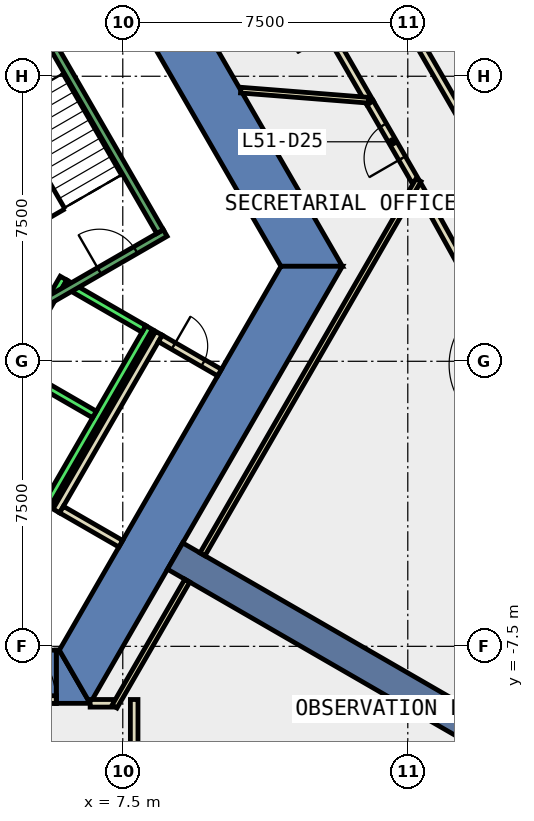
"""IFC4 building model, lengths in metres.
Left out: names, types, materials, properties, quantities, classifications, styles, units other than length and angle.
Written with IfcOpenShell. Run it as: python <this file> out.ifc"""

import sys

from ifc_helpers import new_model, si_unit, direction, frame, frame_2d, origin, place, context, subcontext, project, spatial, polyline, rectangle, outline, extrude, element, fill, save


model = new_model("IFC4")
c1 = context("Model", 3, precision=1e-05, world=origin(), true_north=direction((0.0, 1.0)))
c2 = subcontext(c1, "Body", "Model", "MODEL_VIEW")
j1 = project(units=[si_unit("LENGTHUNIT", "METRE"), si_unit("PLANEANGLEUNIT", "RADIAN")], contexts=[c1])
p1 = place(None, origin())
s1 = spatial("IfcSite", under=j1, at=p1, CompositionType="ELEMENT")
p2 = place(p1, origin())
s2 = spatial("IfcBuilding", under=s1, at=p2, CompositionType="ELEMENT")
p3 = place(p2, frame((0.0, 0.0, 227.6)))
s3 = spatial("IfcBuildingStorey", under=s2, at=p3, CompositionType="ELEMENT", Elevation=227.6)
p4 = place(p3, frame((0.0, 0.0, -0.4)))
e1 = element("IfcWall", 1, at=p4, inside=s3, PredefinedType="SHEAR", context=c2, shape_type="SweptSolid", body=[
    extrude(outline(polyline([(8.084, 11.498), (6.871, 10.798), (11.662, 2.5), (13.279, 2.5), (8.084, 11.498)])), origin(), (0.0, 0.0, 1.0), 4.2),
])
p5 = place(p3, frame((0.0, 0.0, -0.4)))
e2 = element("IfcWall", 2, at=p5, inside=s3, PredefinedType="SHEAR", context=c2, shape_type="SweptSolid", body=[
    extrude(outline(polyline([(5.75, -7.6), (5.75, -9.0), (6.64, -9.0), (5.831, -7.6), (5.75, -7.6)])), origin(), (0.0, 0.0, 1.0), 4.2),
])
p6 = place(p3, frame((0.0, 0.0, 3.6)))
e3 = element("IfcWall", 3, at=p6, inside=s3, PredefinedType="SHEAR", context=c2, shape_type="SweptSolid", body=[
    extrude(outline(polyline([(5.75, -9.0), (5.75, -7.6), (3.75, -7.6), (3.75, -9.0), (5.75, -9.0)])), origin(), (0.0, 0.0, 1.0), 0.2),
])
p7 = place(p3, frame((0.0, 0.0, -0.4)))
e4 = element("IfcWall", 4, at=p7, inside=s3, PredefinedType="SHEAR", context=c2, shape_type="SweptSolid", body=[
    extrude(outline(polyline([(6.64, -9.0), (13.279, 2.5), (11.662, 2.5), (5.831, -7.6), (6.64, -9.0)])), origin(), (0.0, 0.0, 1.0), 4.2),
])
p8 = place(p3, frame((8.877, -5.125, -0.4), z_axis=(0.0, 0.0, 1.0), x_axis=(0.866017533419, -0.500013631625, 0.0)))
e5 = element("IfcWall", 5, at=p8, inside=s3, PredefinedType="SHEAR", context=c2, shape_type="SweptSolid", body=[
    extrude(rectangle(XDim=9.0, YDim=0.8, at=frame_2d((4.5, 0.0))), origin(), (0.0, 0.0, 1.0), 4.2),
])
p9 = place(p3, frame((15.194, 4.747, 0.0), z_axis=(0.0, 0.0, 1.0), x_axis=(-0.500140598757, 0.865944213836, 0.0)))
e6 = element("IfcWall", 6, at=p9, inside=s3, PredefinedType="PARTITIONING", context=c2, shape_type="SweptSolid", body=[
    extrude(rectangle(XDim=2.375, YDim=0.2, at=frame_2d((1.188, 0.0))), origin(), (0.0, 0.0, 1.0), 3.8),
])
p10 = place(p9, frame((0.688, 0.0, 0.0)))
e7 = element("IfcOpeningElement", 7, at=p10, cuts=e6, PredefinedType="OPENING", context=c2, shape_type="SweptSolid", body=[
    extrude(rectangle(XDim=1.0, YDim=2.1, at=frame_2d((0.5, 1.05))), frame((0.0, 0.11, 0.0), z_axis=(0.0, -1.0, 0.0), x_axis=(1.0, 0.0, 0.0)), (0.0, 0.0, 1.0), 0.22),
])
p11 = place(p3, frame((14.006, 6.804, 0.0), z_axis=(0.0, 0.0, 1.0), x_axis=(-0.500032993936, 0.866006353889, 0.0)))
e8 = element("IfcWall", 8, at=p11, inside=s3, PredefinedType="PARTITIONING", context=c2, shape_type="SweptSolid", body=[
    extrude(rectangle(XDim=5.172, YDim=0.2, at=frame_2d((2.586, 0.0))), origin(), (0.0, 0.0, 1.0), 3.8),
])
p12 = place(p11, frame((2.086, 0.0, 0.0)))
e9 = element("IfcOpeningElement", 9, at=p12, cuts=e8, PredefinedType="OPENING", context=c2, shape_type="SweptSolid", body=[
    extrude(rectangle(XDim=1.0, YDim=2.1, at=frame_2d((0.5, 1.05))), frame((0.0, 0.11, 0.0), z_axis=(0.0, -1.0, 0.0), x_axis=(1.0, 0.0, 0.0)), (0.0, 0.0, 1.0), 0.22),
])
p13 = place(p3, frame((19.419, -2.856, 0.0), z_axis=(0.0, 0.0, 1.0), x_axis=(-0.484683114876, 0.874689818252, 0.0)))
e10 = element("IfcWall", 10, at=p13, inside=s3, PredefinedType="PARTITIONING", context=c2, shape_type="SweptSolid", body=[
    extrude(rectangle(XDim=8.123, YDim=0.2, at=frame_2d((4.062, 0.0))), origin(), (0.0, 0.0, 1.0), 3.8),
])
p14 = place(p13, frame((3.161, 0.0, 0.0)))
e11 = element("IfcOpeningElement", 11, at=p14, cuts=e10, PredefinedType="OPENING", context=c2, shape_type="SweptSolid", body=[
    extrude(rectangle(XDim=1.8, YDim=2.1, at=frame_2d((0.9, 1.05))), frame((0.0, 0.11, 0.0), z_axis=(0.0, -1.0, 0.0), x_axis=(1.0, 0.0, 0.0)), (0.0, 0.0, 1.0), 0.22),
])
p15 = place(p3, frame((15.482, 4.249, 0.0), z_axis=(0.0, 0.0, 1.0), x_axis=(-0.500832493767, 0.865544229481, 0.0)))
e12 = element("IfcWall", 12, at=p15, inside=s3, PredefinedType="PARTITIONING", context=c2, shape_type="SweptSolid", body=[
    extrude(rectangle(XDim=0.425, YDim=0.2, at=frame_2d((0.212, 0.0))), origin(), (0.0, 0.0, 1.0), 3.8),
])
p16 = place(p3, frame((15.135, 8.65, 0.0), z_axis=(0.0, 0.0, 1.0), x_axis=(0.500102734445, -0.865966081899, 0.0)))
e13 = element("IfcWall", 13, at=p16, inside=s3, PredefinedType="PARTITIONING", context=c2, shape_type="SweptSolid", body=[
    extrude(rectangle(XDim=4.001, YDim=0.2, at=frame_2d((2.0, 0.0))), origin(), (0.0, 0.0, 1.0), 3.8),
])
p17 = place(p3, frame((5.751, -3.938, 0.0), z_axis=(0.0, 0.0, 1.0), x_axis=(0.500034260056, 0.866005622828, 0.0)))
e14 = element("IfcWall", 14, at=p17, inside=s3, PredefinedType="PARTITIONING", context=c2, shape_type="SweptSolid", body=[
    extrude(rectangle(XDim=5.399, YDim=0.2, at=frame_2d((2.7, 0.0))), origin(), (0.0, 0.0, 1.0), 3.8),
])
p18 = place(p3, frame((8.488, 0.602, 0.0), z_axis=(0.0, 0.0, 1.0), x_axis=(0.86585331735, -0.500297944063, 0.0)))
e15 = element("IfcWall", 15, at=p18, inside=s3, PredefinedType="PARTITIONING", context=c2, shape_type="SweptSolid", body=[
    extrude(rectangle(XDim=1.799, YDim=0.2, at=frame_2d((0.9, 0.0))), origin(), (0.0, 0.0, 1.0), 3.8),
])
p19 = place(p18, frame((0.4, 0.0, 0.0)))
e16 = element("IfcOpeningElement", 16, at=p19, cuts=e15, PredefinedType="OPENING", context=c2, shape_type="SweptSolid", body=[
    extrude(rectangle(XDim=0.9, YDim=2.1, at=frame_2d((0.45, 1.05))), frame((0.0, 0.11, 0.0), z_axis=(0.0, -1.0, 0.0), x_axis=(1.0, 0.0, 0.0)), (0.0, 0.0, 1.0), 0.22),
])
p20 = place(p3, frame((7.447, -4.801, 0.0), z_axis=(0.0, 0.0, 1.0), x_axis=(-0.866316547501, 0.499495384889, 0.0)))
e17 = element("IfcWall", 17, at=p20, inside=s3, PredefinedType="PARTITIONING", context=c2, shape_type="SweptSolid", body=[
    extrude(rectangle(XDim=1.8, YDim=0.2, at=frame_2d((0.9, 0.0))), origin(), (0.0, 0.0, 1.0), 3.8),
])
p21 = place(p3, frame((10.604, 7.135, 0.0), z_axis=(0.0, 0.0, 1.0), x_axis=(0.996887536909, -0.07883678555, 0.0)))
e18 = element("IfcWall", 18, at=p21, inside=s3, PredefinedType="PARTITIONING", context=c2, shape_type="SweptSolid", body=[
    extrude(rectangle(XDim=3.375, YDim=0.15, at=frame_2d((1.688, 0.0))), origin(), (0.0, 0.0, 1.0), 3.8),
])
p22 = place(p3, frame((6.641, -8.999, 0.0), z_axis=(0.0, 0.0, 1.0), x_axis=(1.0, 0.0, 0.0)))
e19 = element("IfcWall", 19, at=p22, inside=s3, PredefinedType="PARTITIONING", context=c2, shape_type="SweptSolid", body=[
    extrude(rectangle(XDim=0.617, YDim=0.2, at=frame_2d((0.309, 0.0))), origin(), (0.0, 0.0, 1.0), 3.8),
])
p23 = place(p3, frame((7.283, -9.086, 0.0), z_axis=(0.0, 0.0, 1.0), x_axis=(0.500035303972, 0.866005020067, 0.0)))
e20 = element("IfcWall", 20, at=p23, inside=s3, PredefinedType="PARTITIONING", context=c2, shape_type="SweptSolid", body=[
    extrude(rectangle(XDim=3.828, YDim=0.15, at=frame_2d((1.914, 0.0))), origin(), (0.0, 0.0, 1.0), 3.8),
])
p24 = place(p3, frame((7.8, -8.899, 0.0), z_axis=(0.0, 0.0, 1.0), x_axis=(0.0, -1.0, 0.0)))
e21 = element("IfcWall", 21, at=p24, inside=s3, PredefinedType="PARTITIONING", context=c2, shape_type="SweptSolid", body=[
    extrude(rectangle(XDim=7.477, YDim=0.2, at=frame_2d((3.739, 0.0))), origin(), (0.0, 0.0, 1.0), 3.8),
])
p25 = place(p3, frame((3.75, -8.9, 0.0), z_axis=(0.0, 0.0, 1.0), x_axis=(1.0, 0.0, 0.0)))
e22 = element("IfcWall", 22, at=p25, inside=s3, PredefinedType="PARTITIONING", context=c2, shape_type="SweptSolid", body=[
    extrude(rectangle(XDim=2.0, YDim=0.2, at=frame_2d((1.0, 0.0))), origin(), (0.0, 0.0, 1.0), 2.4),
])
p26 = place(p25, frame((0.19, 0.0, 0.0)))
e23 = element("IfcOpeningElement", 23, at=p26, cuts=e22, PredefinedType="OPENING", context=c2, shape_type="SweptSolid", body=[
    extrude(rectangle(XDim=1.8, YDim=2.1, at=frame_2d((0.9, 1.05))), frame((0.0, 0.11, 0.0), z_axis=(0.0, -1.0, 0.0), x_axis=(1.0, 0.0, 0.0)), (0.0, 0.0, 1.0), 0.22),
])
p27 = place(p3, frame((9.597, -5.079, 0.0), z_axis=(0.0, 0.0, 1.0), x_axis=(0.499949193323, 0.866054735046, 0.0)))
e24 = element("IfcWall", 24, at=p27, inside=s3, PredefinedType="PARTITIONING", context=c2, shape_type="SweptSolid", body=[
    extrude(rectangle(XDim=11.371, YDim=0.15, at=frame_2d((5.686, 0.0))), origin(), (0.0, 0.0, 1.0), 3.8),
])
p28 = place(p3, frame((3.24, -2.488, 0.0), z_axis=(0.0, 0.0, 1.0), x_axis=(0.500034260056, 0.866005622828, 0.0)))
e25 = element("IfcWall", 25, at=p28, inside=s3, PredefinedType="STANDARD", context=c2, shape_type="SweptSolid", body=[
    extrude(rectangle(XDim=5.399, YDim=0.2, at=frame_2d((2.7, 0.0))), origin(), (0.0, 0.0, 1.0), 3.8),
])
p29 = place(p28, frame((3.225, 0.0, 0.0)))
e26 = element("IfcOpeningElement", 26, at=p29, cuts=e25, PredefinedType="OPENING", context=c2, shape_type="SweptSolid", body=[
    extrude(rectangle(XDim=1.1, YDim=2.1, at=frame_2d((0.55, 1.05))), frame((0.0, 0.11, 0.0), z_axis=(0.0, -1.0, 0.0), x_axis=(1.0, 0.0, 0.0)), (0.0, 0.0, 1.0), 0.22),
])
p30 = place(p28, frame((1.225, 0.0, 0.0)))
e27 = element("IfcOpeningElement", 27, at=p30, cuts=e25, PredefinedType="OPENING", context=c2, shape_type="SweptSolid", body=[
    extrude(rectangle(XDim=1.1, YDim=2.1, at=frame_2d((0.55, 1.05))), frame((0.0, 0.11, 0.0), z_axis=(0.0, -1.0, 0.0), x_axis=(1.0, 0.0, 0.0)), (0.0, 0.0, 1.0), 0.22),
])
p31 = place(p3, frame((5.492, -3.788, 0.0), z_axis=(0.0, 0.0, 1.0), x_axis=(0.500034260056, 0.866005622828, 0.0)))
e28 = element("IfcWall", 28, at=p31, inside=s3, PredefinedType="STANDARD", context=c2, shape_type="SweptSolid", body=[
    extrude(rectangle(XDim=5.399, YDim=0.2, at=frame_2d((2.7, 0.0))), origin(), (0.0, 0.0, 1.0), 3.8),
])
for number, where, z_axis, x_axis in (
    (29, (4.677, -0.2, 0.0), (0.0, 0.0, 1.0), (0.866, -0.5, 0.0)),
    (30, (5.977, 2.052, 0.0), (0.0, 0.0, 1.0), (0.866, -0.5, 0.0)),
):
    element("IfcWall", number, at=place(p3, frame(where, z_axis=z_axis, x_axis=x_axis)), inside=s3, PredefinedType="STANDARD", context=c2, shape_type="SweptSolid", body=[
        extrude(rectangle(XDim=2.399, YDim=0.2, at=frame_2d((1.2, 0.0))), origin(), (0.0, 0.0, 1.0), 3.8),
    ])
p32 = place(p3, frame((4.806, 1.176, 0.0), z_axis=(0.0, 0.0, 1.0), x_axis=(0.866059941101, 0.499940174841, 0.0)))
e31 = element("IfcWall", 31, at=p32, inside=s3, PredefinedType="STANDARD", context=c2, shape_type="SweptSolid", body=[
    extrude(rectangle(XDim=4.4, YDim=0.2, at=frame_2d((2.2, 0.0))), origin(), (0.0, 0.0, 1.0), 3.8),
])
p33 = place(p32, frame((2.4, 0.0, 0.0)))
e32 = element("IfcOpeningElement", 32, at=p33, cuts=e31, PredefinedType="OPENING", context=c2, shape_type="SweptSolid", body=[
    extrude(rectangle(XDim=1.1, YDim=2.2, at=frame_2d((0.55, 1.1))), frame((0.0, 0.11, 0.0), z_axis=(0.0, -1.0, 0.0), x_axis=(1.0, 0.0, 0.0)), (0.0, 0.0, 1.0), 0.22),
])
p34 = place(p3, frame((8.48, 3.412, 0.0), z_axis=(0.0, 0.0, 1.0), x_axis=(-0.499978703459, 0.866037698999, 0.0)))
e33 = element("IfcWall", 33, at=p34, inside=s3, PredefinedType="STANDARD", context=c2, shape_type="SweptSolid", body=[
    extrude(rectangle(XDim=6.9, YDim=0.2, at=frame_2d((3.45, 0.0))), origin(), (0.0, 0.0, 1.0), 3.8),
])
p35 = place(p10, origin())
e34 = element("IfcDoor", 34, at=p35, inside=s3, OperationType="SINGLE_SWING_LEFT", PredefinedType="DOOR", context=c2, shape_type="SweptSolid", body=[
    extrude(rectangle(XDim=1.0, YDim=2.1, at=frame_2d((0.5, 1.05))), frame((0.0, 0.025, 0.0), z_axis=(0.0, -1.0, 0.0), x_axis=(1.0, 0.0, 0.0)), (0.0, 0.0, 1.0), 0.05),
])
fill(e7, e34)
p36 = place(p19, origin())
e35 = element("IfcDoor", 35, at=p36, inside=s3, OperationType="SINGLE_SWING_RIGHT", PredefinedType="DOOR", context=c2, shape_type="SweptSolid", body=[
    extrude(rectangle(XDim=0.9, YDim=2.1, at=frame_2d((0.45, 1.05))), frame((0.0, 0.025, 0.0), z_axis=(0.0, -1.0, 0.0), x_axis=(1.0, 0.0, 0.0)), (0.0, 0.0, 1.0), 0.05),
])
fill(e16, e35)
p37 = place(p26, origin())
e36 = element("IfcDoor", 36, at=p37, inside=s3, OperationType="DOUBLE_DOOR_SINGLE_SWING", PredefinedType="DOOR", context=c2, shape_type="SweptSolid", body=[
    extrude(rectangle(XDim=1.8, YDim=2.1, at=frame_2d((0.9, 1.05))), frame((0.0, 0.025, 0.0), z_axis=(0.0, -1.0, 0.0), x_axis=(1.0, 0.0, 0.0)), (0.0, 0.0, 1.0), 0.05),
])
fill(e23, e36)
p38 = place(p33, origin())
e37 = element("IfcDoor", 37, at=p38, inside=s3, OperationType="SINGLE_SWING_LEFT", PredefinedType="DOOR", context=c2, shape_type="SweptSolid", body=[
    extrude(rectangle(XDim=1.1, YDim=2.2, at=frame_2d((0.55, 1.1))), frame((0.0, 0.025, 0.0), z_axis=(0.0, -1.0, 0.0), x_axis=(1.0, 0.0, 0.0)), (0.0, 0.0, 1.0), 0.05),
])
fill(e32, e37)
save(model, sys.argv[1])
